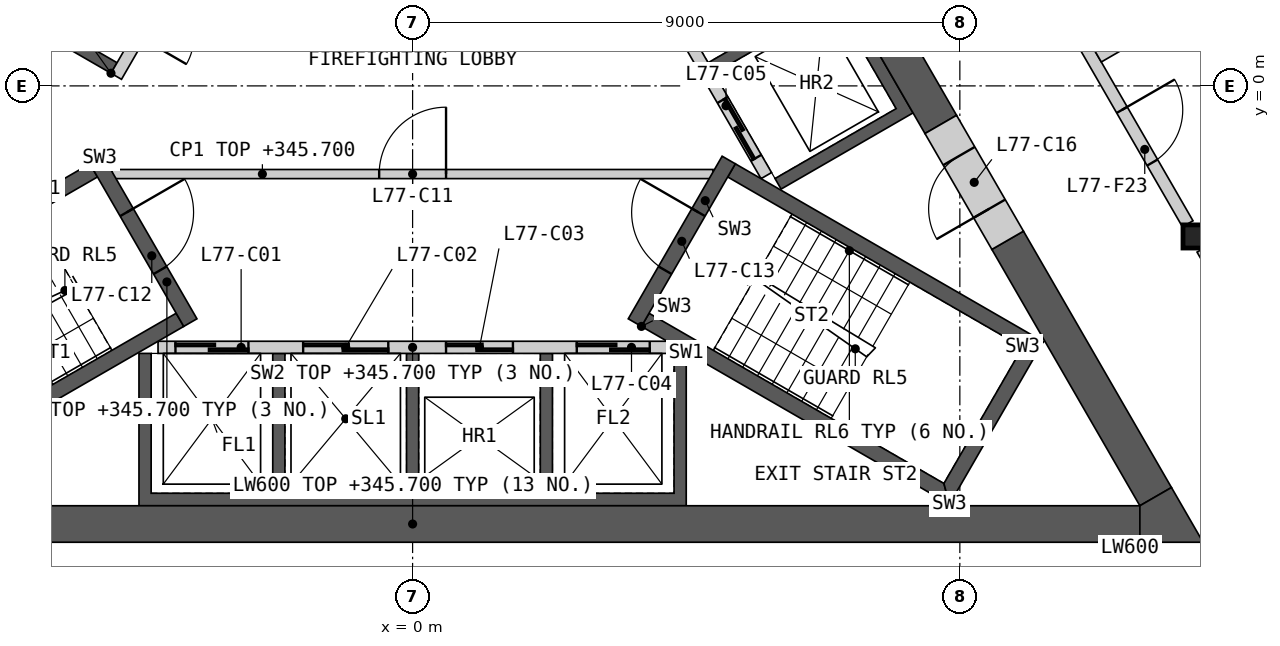
"""IFC4 building model, lengths in metres.
Left out: names, types, materials, properties, quantities, classifications, styles, units other than length and angle.
Written with IfcOpenShell. Run it as: python <this file> out.ifc"""

import sys

from ifc_helpers import new_model, si_unit, direction, frame, frame_2d, origin, origin_2d, place, context, subcontext, project, spatial, polyline, rectangle, i_section, outline, extrude, element, fill, save


model = new_model("IFC4")
c1 = context("Model", 3, precision=1e-05, world=origin(), true_north=direction((0.0, 1.0)))
c2 = subcontext(c1, "Body", "Model", "MODEL_VIEW")
j1 = project(units=[si_unit("LENGTHUNIT", "METRE"), si_unit("PLANEANGLEUNIT", "RADIAN")], contexts=[c1])
p1 = place(None, origin())
s1 = spatial("IfcSite", under=j1, at=p1, CompositionType="ELEMENT")
p2 = place(p1, origin())
s2 = spatial("IfcBuilding", under=s1, at=p2, CompositionType="ELEMENT")
p3 = place(p2, frame((0.0, 0.0, 342.6)))
s3 = spatial("IfcBuildingStorey", under=s2, at=p3, CompositionType="ELEMENT", Elevation=342.6)
p4 = place(p3, frame((12.868, -2.476, 0.0), z_axis=(0.0, 0.0, 1.0), x_axis=(1.0, 0.0, 0.0)))
e1 = element("IfcColumn", 1, at=p4, inside=s3, PredefinedType="COLUMN", context=c2, shape_type="SweptSolid", body=[
    extrude(i_section(OverallWidth=0.396, OverallDepth=0.381, WebThickness=0.019, FlangeThickness=0.03, at=origin_2d()), origin(), (0.0, 0.0, 1.0), 3.4),
])
p5 = place(p3, origin())
e2 = element("IfcWall", 2, at=p5, inside=s3, PredefinedType="SHEAR", context=c2, shape_type="SweptSolid", body=[
    extrude(outline(polyline([(4.5, -4.4), (4.5, -6.906), (-4.5, -6.906), (-4.5, -4.4), (-4.3, -4.4), (-4.3, -6.7), (-2.3, -6.7), (-2.3, -4.4), (-2.1, -4.4), (-2.1, -6.7), (-0.1, -6.7), (-0.1, -4.4), (0.1, -4.4), (0.1, -6.7), (2.1, -6.7), (2.1, -4.4), (2.3, -4.4), (2.3, -6.7), (4.3, -6.7), (4.3, -4.4), (4.5, -4.4)])), origin(), (0.0, 0.0, 1.0), 3.1),
])
p6 = place(p3, frame((-4.187, -4.3, 0.0), z_axis=(0.0, 0.0, 1.0), x_axis=(1.0, 0.0, 0.0)))
e3 = element("IfcWall", 3, at=p6, inside=s3, PredefinedType="SOLIDWALL", context=c2, shape_type="SweptSolid", body=[
    extrude(rectangle(XDim=8.373, YDim=0.2, at=frame_2d((4.187, 0.0))), origin(), (0.0, 0.0, 1.0), 3.1),
])
p7 = place(p6, frame((0.287, 0.0, 0.0)))
e4 = element("IfcOpeningElement", 4, at=p7, cuts=e3, PredefinedType="OPENING", context=c2, shape_type="SweptSolid", body=[
    extrude(rectangle(XDim=1.2, YDim=2.1, at=frame_2d((0.6, 1.05))), frame((0.0, 0.11, 0.0), z_axis=(0.0, -1.0, 0.0), x_axis=(1.0, 0.0, 0.0)), (0.0, 0.0, 1.0), 0.22),
])
p8 = place(p6, frame((2.387, 0.0, 0.0)))
e5 = element("IfcOpeningElement", 5, at=p8, cuts=e3, PredefinedType="OPENING", context=c2, shape_type="SweptSolid", body=[
    extrude(rectangle(XDim=1.4, YDim=2.1, at=frame_2d((0.7, 1.05))), frame((0.0, 0.11, 0.0), z_axis=(0.0, -1.0, 0.0), x_axis=(1.0, 0.0, 0.0)), (0.0, 0.0, 1.0), 0.22),
])
p9 = place(p6, frame((4.737, 0.0, 0.0)))
e6 = element("IfcOpeningElement", 6, at=p9, cuts=e3, PredefinedType="OPENING", context=c2, shape_type="SweptSolid", body=[
    extrude(rectangle(XDim=1.1, YDim=2.1, at=frame_2d((0.55, 1.05))), frame((0.0, 0.11, 0.0), z_axis=(0.0, -1.0, 0.0), x_axis=(1.0, 0.0, 0.0)), (0.0, 0.0, 1.0), 0.22),
])
p10 = place(p6, frame((6.887, 0.0, 0.0)))
e7 = element("IfcOpeningElement", 7, at=p10, cuts=e3, PredefinedType="OPENING", context=c2, shape_type="SweptSolid", body=[
    extrude(rectangle(XDim=1.2, YDim=2.1, at=frame_2d((0.6, 1.05))), frame((0.0, 0.11, 0.0), z_axis=(0.0, -1.0, 0.0), x_axis=(1.0, 0.0, 0.0)), (0.0, 0.0, 1.0), 0.22),
])
p11 = place(p3, origin())
e8 = element("IfcWall", 8, at=p11, inside=s3, PredefinedType="SHEAR", context=c2, shape_type="SweptSolid", body=[
    extrude(outline(polyline([(1.561, 6.097), (3.731, 7.35), (8.231, -0.444), (6.061, -1.697), (5.96, -1.524), (7.952, -0.374), (6.952, 1.358), (4.96, 0.208), (4.861, 0.381), (6.852, 1.531), (5.852, 3.263), (3.861, 2.113), (3.76, 2.287), (5.752, 3.437), (4.752, 5.169), (2.76, 4.019), (2.66, 4.192), (4.652, 5.342), (3.652, 7.074), (1.66, 5.924), (1.561, 6.097)])), origin(), (0.0, 0.0, 1.0), 3.1),
])
p12 = place(p3, frame((5.817, -1.476, 0.0), z_axis=(0.0, 0.0, 1.0), x_axis=(-0.500002616675, 0.866023893041, 0.0)))
e9 = element("IfcWall", 9, at=p12, inside=s3, PredefinedType="SOLIDWALL", context=c2, shape_type="SweptSolid", body=[
    extrude(rectangle(XDim=8.373, YDim=0.2, at=frame_2d((4.187, 0.0))), origin(), (0.0, 0.0, 1.0), 3.1),
])
p13 = place(p12, frame((0.337, 0.0, 0.0)))
e10 = element("IfcOpeningElement", 10, at=p13, cuts=e9, PredefinedType="OPENING", context=c2, shape_type="SweptSolid", body=[
    extrude(rectangle(XDim=1.1, YDim=2.1, at=frame_2d((0.55, 1.05))), frame((0.0, 0.11, 0.0), z_axis=(0.0, -1.0, 0.0), x_axis=(1.0, 0.0, 0.0)), (0.0, 0.0, 1.0), 0.22),
])
p14 = place(p12, frame((2.537, 0.0, 0.0)))
e11 = element("IfcOpeningElement", 11, at=p14, cuts=e9, PredefinedType="OPENING", context=c2, shape_type="SweptSolid", body=[
    extrude(rectangle(XDim=1.1, YDim=2.1, at=frame_2d((0.55, 1.05))), frame((0.0, 0.11, 0.0), z_axis=(0.0, -1.0, 0.0), x_axis=(1.0, 0.0, 0.0)), (0.0, 0.0, 1.0), 0.22),
])
p15 = place(p12, frame((4.737, 0.0, 0.0)))
e12 = element("IfcOpeningElement", 12, at=p15, cuts=e9, PredefinedType="OPENING", context=c2, shape_type="SweptSolid", body=[
    extrude(rectangle(XDim=1.1, YDim=2.1, at=frame_2d((0.55, 1.05))), frame((0.0, 0.11, 0.0), z_axis=(0.0, -1.0, 0.0), x_axis=(1.0, 0.0, 0.0)), (0.0, 0.0, 1.0), 0.22),
])
p16 = place(p12, frame((7.037, 0.0, 0.0)))
e13 = element("IfcOpeningElement", 13, at=p16, cuts=e9, PredefinedType="OPENING", context=c2, shape_type="SweptSolid", body=[
    extrude(rectangle(XDim=0.9, YDim=2.1, at=frame_2d((0.45, 1.05))), frame((0.0, 0.11, 0.0), z_axis=(0.0, -1.0, 0.0), x_axis=(1.0, 0.0, 0.0)), (0.0, 0.0, 1.0), 0.22),
])
p17 = place(p3, origin())
e14 = element("IfcWall", 14, at=p17, inside=s3, PredefinedType="SHEAR", context=c2, shape_type="SweptSolid", body=[
    extrude(outline(polyline([(-4.96, 0.208), (-7.131, 1.461), (-3.731, 7.35), (-1.561, 6.097), (-1.66, 5.924), (-3.652, 7.074), (-5.752, 3.437), (-3.76, 2.287), (-3.861, 2.113), (-5.852, 3.263), (-6.852, 1.531), (-4.861, 0.381), (-4.96, 0.208)])), origin(), (0.0, 0.0, 1.0), 3.1),
])
p18 = place(p3, frame((-1.631, 5.776, 0.0), z_axis=(0.0, 0.0, 1.0), x_axis=(-0.499992876559, -0.866029516466, 0.0)))
e15 = element("IfcWall", 15, at=p18, inside=s3, PredefinedType="SOLIDWALL", context=c2, shape_type="SweptSolid", body=[
    extrude(rectangle(XDim=6.486, YDim=0.2, at=frame_2d((3.243, 0.0))), origin(), (0.0, 0.0, 1.0), 3.1),
])
p19 = place(p18, frame((1.537, 0.0, 0.0)))
e16 = element("IfcOpeningElement", 16, at=p19, cuts=e15, PredefinedType="OPENING", context=c2, shape_type="SweptSolid", body=[
    extrude(rectangle(XDim=0.9, YDim=2.1, at=frame_2d((0.45, 1.05))), frame((0.0, 0.11, 0.0), z_axis=(0.0, -1.0, 0.0), x_axis=(1.0, 0.0, 0.0)), (0.0, 0.0, 1.0), 0.22),
])
p20 = place(p18, frame((4.837, 0.0, 0.0)))
e17 = element("IfcOpeningElement", 17, at=p20, cuts=e15, PredefinedType="OPENING", context=c2, shape_type="SweptSolid", body=[
    extrude(rectangle(XDim=0.9, YDim=2.1, at=frame_2d((0.45, 1.05))), frame((0.0, 0.11, 0.0), z_axis=(0.0, -1.0, 0.0), x_axis=(1.0, 0.0, 0.0)), (0.0, 0.0, 1.0), 0.22),
])
p21 = place(p3, frame((-4.941, -1.45, 0.0), z_axis=(0.0, 0.0, 1.0), x_axis=(1.0, 0.0, 0.0)))
e18 = element("IfcWall", 18, at=p21, inside=s3, PredefinedType="PARTITIONING", context=c2, shape_type="SweptSolid", body=[
    extrude(rectangle(XDim=9.882, YDim=0.15, at=frame_2d((4.941, 0.0))), origin(), (0.0, 0.0, 1.0), 3.1),
])
p22 = place(p21, frame((4.391, 0.0, 0.0)))
e19 = element("IfcOpeningElement", 19, at=p22, cuts=e18, PredefinedType="OPENING", context=c2, shape_type="SweptSolid", body=[
    extrude(rectangle(XDim=1.1, YDim=2.1, at=frame_2d((0.55, 1.05))), frame((0.0, 0.085, 0.0), z_axis=(0.0, -1.0, 0.0), x_axis=(1.0, 0.0, 0.0)), (0.0, 0.0, 1.0), 0.17),
])
p23 = place(p3, origin())
e20 = element("IfcWall", 20, at=p23, inside=s3, PredefinedType="SHEAR", context=c2, shape_type="SweptSolid", body=[
    extrude(outline(polyline([(-5.307, -1.281), (-10.374, -4.206), (-10.032, -4.298), (-5.182, -1.498), (-5.307, -1.281)])), origin(), (0.0, 0.0, 1.0), 3.1),
])
p24 = place(p3, origin())
e21 = element("IfcWall", 21, at=p24, inside=s3, PredefinedType="SHEAR", context=c2, shape_type="SweptSolid", body=[
    extrude(outline(polyline([(-8.738, -6.539), (-8.83, -6.881), (-3.763, -3.956), (-3.888, -3.739), (-8.738, -6.539)])), origin(), (0.0, 0.0, 1.0), 3.1),
])
p25 = place(p3, frame((-5.199, -1.219, 0.0), z_axis=(0.0, 0.0, 1.0), x_axis=(0.499982516597, -0.866035497597, 0.0)))
e22 = element("IfcWall", 22, at=p25, inside=s3, PredefinedType="SHEAR", context=c2, shape_type="SweptSolid", body=[
    extrude(rectangle(XDim=3.088, YDim=0.25, at=frame_2d((1.544, 0.0))), origin(), (0.0, 0.0, 1.0), 3.1),
])
p26 = place(p25, frame((0.994, 0.0, 0.0)))
e23 = element("IfcOpeningElement", 23, at=p26, cuts=e22, PredefinedType="OPENING", context=c2, shape_type="SweptSolid", body=[
    extrude(rectangle(XDim=1.1, YDim=2.1, at=frame_2d((0.55, 1.05))), frame((0.0, 0.135, 0.0), z_axis=(0.0, -1.0, 0.0), x_axis=(1.0, 0.0, 0.0)), (0.0, 0.0, 1.0), 0.27),
])
p27 = place(p3, origin())
e24 = element("IfcWall", 24, at=p27, inside=s3, PredefinedType="SHEAR", context=c2, shape_type="SweptSolid", body=[
    extrude(outline(polyline([(3.763, -3.956), (8.83, -6.881), (8.738, -6.539), (3.888, -3.739), (3.763, -3.956)])), origin(), (0.0, 0.0, 1.0), 3.1),
])
p28 = place(p3, origin())
e25 = element("IfcWall", 25, at=p28, inside=s3, PredefinedType="SHEAR", context=c2, shape_type="SweptSolid", body=[
    extrude(outline(polyline([(8.83, -6.881), (10.374, -4.206), (10.032, -4.298), (8.738, -6.539), (8.83, -6.881)])), origin(), (0.0, 0.0, 1.0), 3.1),
])
p29 = place(p3, origin())
e26 = element("IfcWall", 26, at=p29, inside=s3, PredefinedType="SHEAR", context=c2, shape_type="SweptSolid", body=[
    extrude(outline(polyline([(10.032, -4.298), (10.374, -4.206), (5.307, -1.281), (5.182, -1.498), (10.032, -4.298)])), origin(), (0.0, 0.0, 1.0), 3.1),
])
p30 = place(p3, frame((3.655, -3.893, 0.0), z_axis=(0.0, 0.0, 1.0), x_axis=(0.499982516597, 0.866035497597, 0.0)))
e27 = element("IfcWall", 27, at=p30, inside=s3, PredefinedType="SHEAR", context=c2, shape_type="SweptSolid", body=[
    extrude(rectangle(XDim=3.088, YDim=0.25, at=frame_2d((1.544, 0.0))), origin(), (0.0, 0.0, 1.0), 3.1),
])
p31 = place(p30, frame((0.994, 0.0, 0.0)))
e28 = element("IfcOpeningElement", 28, at=p31, cuts=e27, PredefinedType="OPENING", context=c2, shape_type="SweptSolid", body=[
    extrude(rectangle(XDim=1.1, YDim=2.1, at=frame_2d((0.55, 1.05))), frame((0.0, 0.135, 0.0), z_axis=(0.0, -1.0, 0.0), x_axis=(1.0, 0.0, 0.0)), (0.0, 0.0, 1.0), 0.27),
])
p32 = place(p3, frame((-11.961, -7.206, 0.0), z_axis=(0.0, 0.0, 1.0), x_axis=(1.0, 0.0, 0.0)))
e29 = element("IfcWall", 29, at=p32, inside=s3, PredefinedType="SHEAR", context=c2, shape_type="SweptSolid", body=[
    extrude(rectangle(XDim=23.921, YDim=0.6, at=frame_2d((11.961, 0.0))), origin(), (0.0, 0.0, 1.0), 3.1),
])
p33 = place(p3, frame((8.686, -0.634, 0.0), z_axis=(0.0, 0.0, 1.0), x_axis=(-0.50001836461, 0.866014800712, 0.0)))
e30 = element("IfcWall", 30, at=p33, inside=s3, PredefinedType="SHEAR", context=c2, shape_type="SweptSolid", body=[
    extrude(rectangle(XDim=10.451, YDim=0.6, at=frame_2d((5.225, 0.0))), origin(), (0.0, 0.0, 1.0), 3.1),
])
p34 = place(p3, frame((12.221, -6.756, 0.0), z_axis=(0.0, 0.0, 1.0), x_axis=(-0.50000604952, 0.866021911064, 0.0)))
e31 = element("IfcWall", 31, at=p34, inside=s3, PredefinedType="SHEAR", context=c2, shape_type="SweptSolid", body=[
    extrude(rectangle(XDim=4.869, YDim=0.6, at=frame_2d((2.434, 0.0))), origin(), (0.0, 0.0, 1.0), 3.1),
])
p35 = place(p3, origin())
e32 = element("IfcWall", 32, at=p35, inside=s3, PredefinedType="SHEAR", context=c2, shape_type="SweptSolid", body=[
    extrude(outline(polyline([(11.961, -7.506), (11.961, -6.906), (12.48, -6.606), (13.0, -7.506), (11.961, -7.506)])), origin(), (0.0, 0.0, 1.0), 3.1),
])
p36 = place(p3, frame((9.786, -2.539, 0.0), z_axis=(0.0, 0.0, 1.0), x_axis=(-0.499981787252, 0.866035918664, 0.0)))
e33 = element("IfcWall", 33, at=p36, inside=s3, PredefinedType="SHEAR", context=c2, shape_type="SweptSolid", body=[
    extrude(rectangle(XDim=2.2, YDim=0.6, at=frame_2d((1.1, 0.0))), origin(), (0.0, 0.0, 1.0), 3.1),
])
p37 = place(p36, frame((0.6, 0.0, 0.0)))
e34 = element("IfcOpeningElement", 34, at=p37, cuts=e33, PredefinedType="OPENING", context=c2, shape_type="SweptSolid", body=[
    extrude(rectangle(XDim=1.0, YDim=2.1, at=frame_2d((0.5, 1.05))), frame((0.0, 0.31, 0.0), z_axis=(0.0, -1.0, 0.0), x_axis=(1.0, 0.0, 0.0)), (0.0, 0.0, 1.0), 0.62),
])
p38 = place(p3, frame((8.698, 4.745, 0.0), z_axis=(0.0, 0.0, 1.0), x_axis=(0.499984266882, -0.866034487114, 0.0)))
e35 = element("IfcWall", 35, at=p38, inside=s3, PredefinedType="PARTITIONING", context=c2, shape_type="SweptSolid", body=[
    extrude(rectangle(XDim=8.099, YDim=0.2, at=frame_2d((4.049, 0.0))), origin(), (0.0, 0.0, 1.0), 3.1),
])
p39 = place(p38, frame((5.935, 0.0, 0.0)))
e36 = element("IfcOpeningElement", 36, at=p39, cuts=e35, PredefinedType="OPENING", context=c2, shape_type="SweptSolid", body=[
    extrude(rectangle(XDim=1.0, YDim=2.1, at=frame_2d((0.5, 1.05))), frame((0.0, 0.11, 0.0), z_axis=(0.0, -1.0, 0.0), x_axis=(1.0, 0.0, 0.0)), (0.0, 0.0, 1.0), 0.22),
])
p40 = place(p3, frame((12.988, -2.684, 0.0), z_axis=(0.0, 0.0, 1.0), x_axis=(0.500003406062, -0.866023437285, 0.0)))
e37 = element("IfcWall", 37, at=p40, inside=s3, PredefinedType="PARTITIONING", context=c2, shape_type="SweptSolid", body=[
    extrude(rectangle(XDim=4.288, YDim=0.2, at=frame_2d((2.144, 0.0))), origin(), (0.0, 0.0, 1.0), 3.1),
])
p41 = place(p3, frame((11.264, 0.502, 0.0), z_axis=(0.0, 0.0, 1.0), x_axis=(0.866030925526, 0.499990435942, 0.0)))
e38 = element("IfcWall", 38, at=p41, inside=s3, PredefinedType="PARTITIONING", context=c2, shape_type="SweptSolid", body=[
    extrude(rectangle(XDim=2.55, YDim=0.25, at=frame_2d((1.275, 0.0))), origin(), (0.0, 0.0, 1.0), 2.33),
])
p42 = place(p3, frame((12.14, 4.183, 0.0), z_axis=(0.0, 0.0, 1.0), x_axis=(0.499996545922, -0.866027397988, 0.0)))
e39 = element("IfcWall", 39, at=p42, inside=s3, PredefinedType="PARTITIONING", context=c2, shape_type="SweptSolid", body=[
    extrude(rectangle(XDim=5.5, YDim=0.1, at=frame_2d((2.75, 0.0))), origin(), (0.0, 0.0, 1.0), 2.33),
])
p43 = place(p7, origin())
e40 = element("IfcDoor", 40, at=p43, inside=s3, OperationType="SLIDING_TO_LEFT", PredefinedType="DOOR", context=c2, shape_type="SweptSolid", body=[
    extrude(rectangle(XDim=1.2, YDim=2.1, at=frame_2d((0.6, 1.05))), frame((0.0, 0.025, 0.0), z_axis=(0.0, -1.0, 0.0), x_axis=(1.0, 0.0, 0.0)), (0.0, 0.0, 1.0), 0.05),
])
fill(e4, e40)
p44 = place(p8, origin())
e41 = element("IfcDoor", 41, at=p44, inside=s3, OperationType="SLIDING_TO_LEFT", PredefinedType="DOOR", context=c2, shape_type="SweptSolid", body=[
    extrude(rectangle(XDim=1.4, YDim=2.1, at=frame_2d((0.7, 1.05))), frame((0.0, 0.025, 0.0), z_axis=(0.0, -1.0, 0.0), x_axis=(1.0, 0.0, 0.0)), (0.0, 0.0, 1.0), 0.05),
])
fill(e5, e41)
p45 = place(p9, origin())
e42 = element("IfcDoor", 42, at=p45, inside=s3, OperationType="SLIDING_TO_LEFT", PredefinedType="DOOR", context=c2, shape_type="SweptSolid", body=[
    extrude(rectangle(XDim=1.1, YDim=2.1, at=frame_2d((0.55, 1.05))), frame((0.0, 0.025, 0.0), z_axis=(0.0, -1.0, 0.0), x_axis=(1.0, 0.0, 0.0)), (0.0, 0.0, 1.0), 0.05),
])
fill(e6, e42)
p46 = place(p10, origin())
e43 = element("IfcDoor", 43, at=p46, inside=s3, OperationType="SLIDING_TO_LEFT", PredefinedType="DOOR", context=c2, shape_type="SweptSolid", body=[
    extrude(rectangle(XDim=1.2, YDim=2.1, at=frame_2d((0.6, 1.05))), frame((0.0, 0.025, 0.0), z_axis=(0.0, -1.0, 0.0), x_axis=(1.0, 0.0, 0.0)), (0.0, 0.0, 1.0), 0.05),
])
fill(e7, e43)
p47 = place(p13, origin())
e44 = element("IfcDoor", 44, at=p47, inside=s3, OperationType="SLIDING_TO_LEFT", PredefinedType="DOOR", context=c2, shape_type="SweptSolid", body=[
    extrude(rectangle(XDim=1.1, YDim=2.1, at=frame_2d((0.55, 1.05))), frame((0.0, 0.025, 0.0), z_axis=(0.0, -1.0, 0.0), x_axis=(1.0, 0.0, 0.0)), (0.0, 0.0, 1.0), 0.05),
])
fill(e10, e44)
p48 = place(p22, origin())
e45 = element("IfcDoor", 45, at=p48, inside=s3, OperationType="SINGLE_SWING_RIGHT", PredefinedType="DOOR", context=c2, shape_type="SweptSolid", body=[
    extrude(rectangle(XDim=1.1, YDim=2.1, at=frame_2d((0.55, 1.05))), frame((0.0, 0.025, 0.0), z_axis=(0.0, -1.0, 0.0), x_axis=(1.0, 0.0, 0.0)), (0.0, 0.0, 1.0), 0.05),
])
fill(e19, e45)
p49 = place(p26, origin())
e46 = element("IfcDoor", 46, at=p49, inside=s3, OperationType="SINGLE_SWING_LEFT", PredefinedType="DOOR", context=c2, shape_type="SweptSolid", body=[
    extrude(rectangle(XDim=1.1, YDim=2.1, at=frame_2d((0.55, 1.05))), frame((0.0, 0.025, 0.0), z_axis=(0.0, -1.0, 0.0), x_axis=(1.0, 0.0, 0.0)), (0.0, 0.0, 1.0), 0.05),
])
fill(e23, e46)
p50 = place(p31, origin())
e47 = element("IfcDoor", 47, at=p50, inside=s3, OperationType="SINGLE_SWING_RIGHT", PredefinedType="DOOR", context=c2, shape_type="SweptSolid", body=[
    extrude(rectangle(XDim=1.1, YDim=2.1, at=frame_2d((0.55, 1.05))), frame((0.0, 0.025, 0.0), z_axis=(0.0, -1.0, 0.0), x_axis=(1.0, 0.0, 0.0)), (0.0, 0.0, 1.0), 0.05),
])
fill(e28, e47)
p51 = place(p37, origin())
e48 = element("IfcDoor", 48, at=p51, inside=s3, OperationType="SINGLE_SWING_LEFT", PredefinedType="DOOR", context=c2, shape_type="SweptSolid", body=[
    extrude(rectangle(XDim=1.0, YDim=2.1, at=frame_2d((0.5, 1.05))), frame((0.0, 0.055, 0.0), z_axis=(0.0, -1.0, 0.0), x_axis=(1.0, 0.0, 0.0)), (0.0, 0.0, 1.0), 0.05),
])
fill(e34, e48)
p52 = place(p39, origin())
e49 = element("IfcDoor", 49, at=p52, inside=s3, OperationType="SINGLE_SWING_LEFT", PredefinedType="DOOR", context=c2, shape_type="SweptSolid", body=[
    extrude(rectangle(XDim=1.0, YDim=2.1, at=frame_2d((0.5, 1.05))), frame((0.0, 0.025, 0.0), z_axis=(0.0, -1.0, 0.0), x_axis=(1.0, 0.0, 0.0)), (0.0, 0.0, 1.0), 0.05),
])
fill(e36, e49)
save(model, sys.argv[1])
